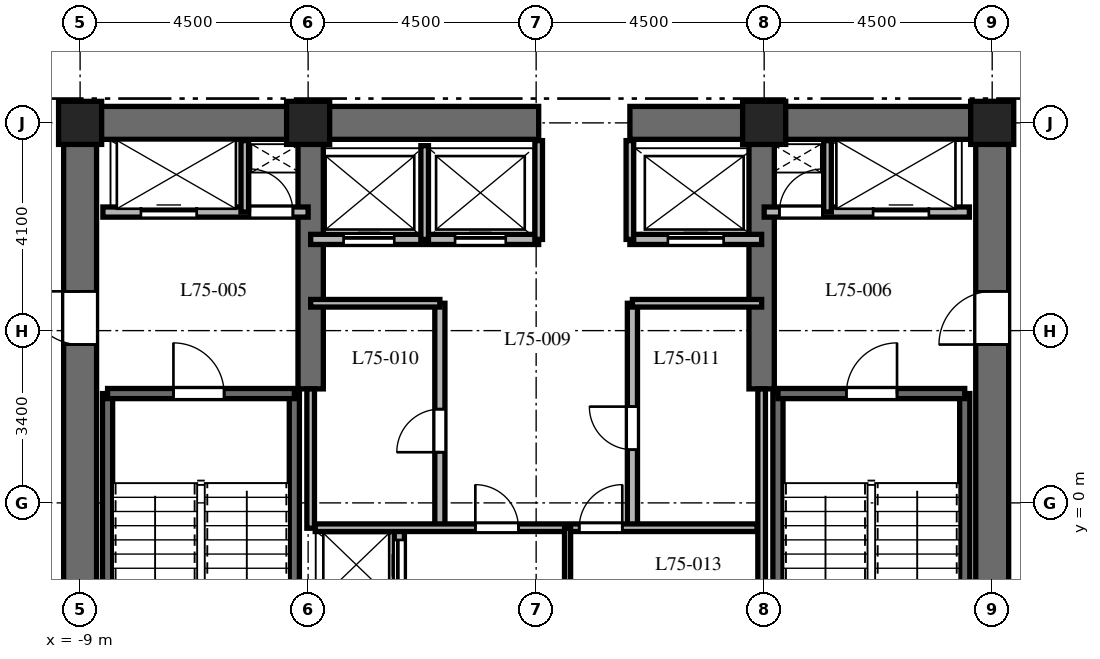
"""IFC4 building model, lengths in metres.
Left out: names, types, materials, properties, quantities, classifications, styles, units other than length and angle.
Written with IfcOpenShell. Run it as: python <this file> out.ifc"""

import sys

from ifc_helpers import new_model, si_unit, direction, frame, frame_2d, origin, origin_2d, place, context, subcontext, project, spatial, rectangle, extrude, element, fill, save


model = new_model("IFC4")
c1 = context("Model", 3, precision=1e-05, world=origin(), true_north=direction((0.0, 1.0)))
c2 = subcontext(c1, "Body", "Model", "MODEL_VIEW")
j1 = project(units=[si_unit("LENGTHUNIT", "METRE"), si_unit("PLANEANGLEUNIT", "RADIAN")], contexts=[c1])
p1 = place(None, origin())
s1 = spatial("IfcSite", under=j1, at=p1, CompositionType="ELEMENT")
p2 = place(p1, origin())
s2 = spatial("IfcBuilding", under=s1, at=p2, CompositionType="ELEMENT")
p3 = place(p2, frame((0.0, 0.0, 301.5)))
s3 = spatial("IfcBuildingStorey", under=s2, at=p3, CompositionType="ELEMENT", Elevation=301.5)
p4 = place(p3, frame((-9.325, 7.5, 0.0), z_axis=(0.0, 0.0, 1.0), x_axis=(1.0, 0.0, 0.0)))
e1 = element("IfcWall", 1, at=p4, inside=s3, PredefinedType="SHEAR", context=c2, shape_type="SweptSolid", body=[
    extrude(rectangle(XDim=9.375, YDim=0.65, at=frame_2d((4.688, 0.0))), origin(), (0.0, 0.0, 1.0), 3.9),
])
p5 = place(p3, frame((1.85, 7.5, 0.0), z_axis=(0.0, 0.0, 1.0), x_axis=(1.0, 0.0, 0.0)))
e2 = element("IfcWall", 2, at=p5, inside=s3, PredefinedType="SHEAR", context=c2, shape_type="SweptSolid", body=[
    extrude(rectangle(XDim=7.475, YDim=0.65, at=frame_2d((3.737, 0.0))), origin(), (0.0, 0.0, 1.0), 3.9),
])
p6 = place(p3, frame((-9.0, -7.175, 0.0), z_axis=(0.0, 0.0, 1.0), x_axis=(0.0, 1.0, 0.0)))
e3 = element("IfcWall", 3, at=p6, inside=s3, PredefinedType="SHEAR", context=c2, shape_type="SweptSolid", body=[
    extrude(rectangle(XDim=14.35, YDim=0.65, at=frame_2d((7.175, 0.0))), origin(), (0.0, 0.0, 1.0), 3.9),
])
p7 = place(p6, frame((10.3, 0.0, 0.0)))
e4 = element("IfcOpeningElement", 4, at=p7, cuts=e3, PredefinedType="OPENING", context=c2, shape_type="SweptSolid", body=[
    extrude(rectangle(XDim=1.05, YDim=2.15, at=frame_2d((0.525, 1.075))), frame((0.0, 0.335, 0.0), z_axis=(0.0, -1.0, 0.0), x_axis=(1.0, 0.0, 0.0)), (0.0, 0.0, 1.0), 0.67),
])
p8 = place(p3, frame((9.0, -7.175, 0.0), z_axis=(0.0, 0.0, 1.0), x_axis=(0.0, 1.0, 0.0)))
e5 = element("IfcWall", 5, at=p8, inside=s3, PredefinedType="SHEAR", context=c2, shape_type="SweptSolid", body=[
    extrude(rectangle(XDim=14.35, YDim=0.65, at=frame_2d((7.175, 0.0))), origin(), (0.0, 0.0, 1.0), 3.9),
])
p9 = place(p8, frame((10.3, 0.0, 0.0)))
e6 = element("IfcOpeningElement", 6, at=p9, cuts=e5, PredefinedType="OPENING", context=c2, shape_type="SweptSolid", body=[
    extrude(rectangle(XDim=1.05, YDim=2.15, at=frame_2d((0.525, 1.075))), frame((0.0, 0.335, 0.0), z_axis=(0.0, -1.0, 0.0), x_axis=(1.0, 0.0, 0.0)), (0.0, 0.0, 1.0), 0.67),
])
for number, where, z_axis, x_axis in (
    (7, (-4.45, 2.25, 0.0), (0.0, 0.0, 1.0), (0.0, 1.0, 0.0)),
    (8, (4.45, 2.25, 0.0), (0.0, 0.0, 1.0), (0.0, 1.0, 0.0)),
):
    element("IfcWall", number, at=place(p3, frame(where, z_axis=z_axis, x_axis=x_axis)), inside=s3, PredefinedType="SHEAR", context=c2, shape_type="SweptSolid", body=[
        extrude(rectangle(XDim=4.925, YDim=0.5, at=frame_2d((2.462, 0.0))), origin(), (0.0, 0.0, 1.0), 3.9),
    ])
for number, where, z_axis, x_axis in (
    (9, (-8.458, -6.985, 0.0), (0.0, 0.0, 1.0), (0.0, 1.0, 0.0)),
    (10, (-4.772, -6.985, 0.0), (0.0, 0.0, 1.0), (0.0, 1.0, 0.0)),
):
    element("IfcWall", number, at=place(p3, frame(where, z_axis=z_axis, x_axis=x_axis)), inside=s3, PredefinedType="SHEAR", context=c2, shape_type="SweptSolid", body=[
        extrude(rectangle(XDim=9.143, YDim=0.2, at=frame_2d((4.572, 0.0))), origin(), (0.0, 0.0, 1.0), 3.9),
    ])
p10 = place(p3, frame((-8.458, 2.158, 0.0), z_axis=(0.0, 0.0, 1.0), x_axis=(1.0, 0.0, 0.0)))
e11 = element("IfcWall", 11, at=p10, inside=s3, PredefinedType="SHEAR", context=c2, shape_type="SweptSolid", body=[
    extrude(rectangle(XDim=3.686, YDim=0.2, at=frame_2d((1.843, 0.0))), origin(), (0.0, 0.0, 1.0), 3.9),
])
p11 = place(p10, frame((1.3, 0.0, 0.0)))
e12 = element("IfcOpeningElement", 12, at=p11, cuts=e11, PredefinedType="OPENING", context=c2, shape_type="SweptSolid", body=[
    extrude(rectangle(XDim=1.0, YDim=2.15, at=frame_2d((0.5, 1.075))), frame((0.0, 0.11, 0.0), z_axis=(0.0, -1.0, 0.0), x_axis=(1.0, 0.0, 0.0)), (0.0, 0.0, 1.0), 0.22),
])
for number, where, z_axis, x_axis in (
    (13, (4.772, -6.985, 0.0), (0.0, 0.0, 1.0), (0.0, 1.0, 0.0)),
    (14, (8.458, -6.985, 0.0), (0.0, 0.0, 1.0), (0.0, 1.0, 0.0)),
):
    element("IfcWall", number, at=place(p3, frame(where, z_axis=z_axis, x_axis=x_axis)), inside=s3, PredefinedType="SHEAR", context=c2, shape_type="SweptSolid", body=[
        extrude(rectangle(XDim=9.143, YDim=0.2, at=frame_2d((4.572, 0.0))), origin(), (0.0, 0.0, 1.0), 3.9),
    ])
p12 = place(p3, frame((4.772, 2.158, 0.0), z_axis=(0.0, 0.0, 1.0), x_axis=(1.0, 0.0, 0.0)))
e15 = element("IfcWall", 15, at=p12, inside=s3, PredefinedType="SHEAR", context=c2, shape_type="SweptSolid", body=[
    extrude(rectangle(XDim=3.686, YDim=0.2, at=frame_2d((1.843, 0.0))), origin(), (0.0, 0.0, 1.0), 3.9),
])
p13 = place(p12, frame((1.35, 0.0, 0.0)))
e16 = element("IfcOpeningElement", 16, at=p13, cuts=e15, PredefinedType="OPENING", context=c2, shape_type="SweptSolid", body=[
    extrude(rectangle(XDim=1.0, YDim=2.15, at=frame_2d((0.5, 1.075))), frame((0.0, 0.11, 0.0), z_axis=(0.0, -1.0, 0.0), x_axis=(1.0, 0.0, 0.0)), (0.0, 0.0, 1.0), 0.22),
])
for number, where, z_axis, x_axis in (
    (17, (9.0, 7.5, 0.0), (0.0, 0.0, 1.0), (1.0, 0.0, 0.0)),
    (18, (4.5, 7.5, 0.0), (0.0, 0.0, 1.0), (1.0, 0.0, 0.0)),
    (19, (-4.5, 7.5, 0.0), (0.0, 0.0, 1.0), (1.0, 0.0, 0.0)),
    (20, (-9.0, 7.5, 0.0), (0.0, 0.0, 1.0), (1.0, 0.0, 0.0)),
):
    element("IfcColumn", number, at=place(p3, frame(where, z_axis=z_axis, x_axis=x_axis)), inside=s3, PredefinedType="COLUMN", context=c2, shape_type="SweptSolid", body=[
        extrude(rectangle(XDim=0.85, YDim=0.85, at=origin_2d()), origin(), (0.0, 0.0, 1.0), 3.9),
    ])
p14 = place(p3, frame((-8.55, 5.74, 0.0), z_axis=(0.0, 0.0, 1.0), x_axis=(1.0, 0.0, 0.0)))
e21 = element("IfcWall", 21, at=p14, inside=s3, PredefinedType="PARTITIONING", context=c2, shape_type="SweptSolid", body=[
    extrude(rectangle(XDim=4.05, YDim=0.2, at=frame_2d((2.025, 0.0))), origin(), (0.0, 0.0, 1.0), 3.58),
])
p15 = place(p14, frame((0.75, 0.0, 0.0)))
e22 = element("IfcOpeningElement", 22, at=p15, cuts=e21, PredefinedType="OPENING", context=c2, shape_type="SweptSolid", body=[
    extrude(rectangle(XDim=1.1, YDim=2.2, at=frame_2d((0.55, 1.1))), frame((0.0, 0.11, 0.0), z_axis=(0.0, -1.0, 0.0), x_axis=(1.0, 0.0, 0.0)), (0.0, 0.0, 1.0), 0.22),
])
p16 = place(p14, frame((2.9, 0.0, 0.0)))
e23 = element("IfcOpeningElement", 23, at=p16, cuts=e21, PredefinedType="OPENING", context=c2, shape_type="SweptSolid", body=[
    extrude(rectangle(XDim=0.85, YDim=2.03, at=frame_2d((0.425, 1.015))), frame((0.0, 0.11, 0.0), z_axis=(0.0, -1.0, 0.0), x_axis=(1.0, 0.0, 0.0)), (0.0, 0.0, 1.0), 0.22),
])
p17 = place(p3, frame((-5.75, 5.74, 0.0), z_axis=(0.0, 0.0, 1.0), x_axis=(0.0, 1.0, 0.0)))
e24 = element("IfcWall", 24, at=p17, inside=s3, PredefinedType="PARTITIONING", context=c2, shape_type="SweptSolid", body=[
    extrude(rectangle(XDim=1.41, YDim=0.15, at=frame_2d((0.705, 0.0))), origin(), (0.0, 0.0, 1.0), 3.58),
])
p18 = place(p3, frame((4.5, 5.74, 0.0), z_axis=(0.0, 0.0, 1.0), x_axis=(1.0, 0.0, 0.0)))
e25 = element("IfcWall", 25, at=p18, inside=s3, PredefinedType="PARTITIONING", context=c2, shape_type="SweptSolid", body=[
    extrude(rectangle(XDim=4.05, YDim=0.2, at=frame_2d((2.025, 0.0))), origin(), (0.0, 0.0, 1.0), 3.58),
])
p19 = place(p18, frame((0.3, 0.0, 0.0)))
e26 = element("IfcOpeningElement", 26, at=p19, cuts=e25, PredefinedType="OPENING", context=c2, shape_type="SweptSolid", body=[
    extrude(rectangle(XDim=0.85, YDim=2.03, at=frame_2d((0.425, 1.015))), frame((0.0, 0.11, 0.0), z_axis=(0.0, -1.0, 0.0), x_axis=(1.0, 0.0, 0.0)), (0.0, 0.0, 1.0), 0.22),
])
p20 = place(p18, frame((2.15, 0.0, 0.0)))
e27 = element("IfcOpeningElement", 27, at=p20, cuts=e25, PredefinedType="OPENING", context=c2, shape_type="SweptSolid", body=[
    extrude(rectangle(XDim=1.1, YDim=2.2, at=frame_2d((0.55, 1.1))), frame((0.0, 0.11, 0.0), z_axis=(0.0, -1.0, 0.0), x_axis=(1.0, 0.0, 0.0)), (0.0, 0.0, 1.0), 0.22),
])
p21 = place(p3, frame((5.75, 5.74, 0.0), z_axis=(0.0, 0.0, 1.0), x_axis=(0.0, 1.0, 0.0)))
e28 = element("IfcWall", 28, at=p21, inside=s3, PredefinedType="PARTITIONING", context=c2, shape_type="SweptSolid", body=[
    extrude(rectangle(XDim=1.41, YDim=0.15, at=frame_2d((0.705, 0.0))), origin(), (0.0, 0.0, 1.0), 3.58),
])
p22 = place(p3, frame((-2.7, -1.972, 0.0), z_axis=(0.0, 0.0, 1.0), x_axis=(0.0, 1.0, 0.0)))
e29 = element("IfcWall", 29, at=p22, inside=s3, PredefinedType="PARTITIONING", context=c2, shape_type="SweptSolid", body=[
    extrude(rectangle(XDim=1.472, YDim=0.2, at=frame_2d((0.736, 0.0))), origin(), (0.0, 0.0, 1.0), 3.58),
])
p23 = place(p22, frame((0.24, 0.0, 0.0)))
e30 = element("IfcOpeningElement", 30, at=p23, cuts=e29, PredefinedType="OPENING", context=c2, shape_type="SweptSolid", body=[
    extrude(rectangle(XDim=1.0, YDim=2.2, at=frame_2d((0.5, 1.1))), frame((0.0, 0.11, 0.0), z_axis=(0.0, -1.0, 0.0), x_axis=(1.0, 0.0, 0.0)), (0.0, 0.0, 1.0), 0.22),
])
p24 = place(p3, frame((-4.45, 5.2, 0.0), z_axis=(0.0, 0.0, 1.0), x_axis=(1.0, 0.0, 0.0)))
e31 = element("IfcWall", 31, at=p24, inside=s3, PredefinedType="PARTITIONING", context=c2, shape_type="SweptSolid", body=[
    extrude(rectangle(XDim=4.5, YDim=0.2, at=frame_2d((2.25, 0.0))), origin(), (0.0, 0.0, 1.0), 3.58),
])
p25 = place(p24, frame((0.65, 0.0, 0.0)))
e32 = element("IfcOpeningElement", 32, at=p25, cuts=e31, PredefinedType="OPENING", context=c2, shape_type="SweptSolid", body=[
    extrude(rectangle(XDim=1.0, YDim=2.2, at=frame_2d((0.5, 1.1))), frame((0.0, 0.11, 0.0), z_axis=(0.0, -1.0, 0.0), x_axis=(1.0, 0.0, 0.0)), (0.0, 0.0, 1.0), 0.22),
])
p26 = place(p24, frame((2.85, 0.0, 0.0)))
e33 = element("IfcOpeningElement", 33, at=p26, cuts=e31, PredefinedType="OPENING", context=c2, shape_type="SweptSolid", body=[
    extrude(rectangle(XDim=1.0, YDim=2.2, at=frame_2d((0.5, 1.1))), frame((0.0, 0.11, 0.0), z_axis=(0.0, -1.0, 0.0), x_axis=(1.0, 0.0, 0.0)), (0.0, 0.0, 1.0), 0.22),
])
p27 = place(p3, frame((1.85, 5.2, 0.0), z_axis=(0.0, 0.0, 1.0), x_axis=(1.0, 0.0, 0.0)))
e34 = element("IfcWall", 34, at=p27, inside=s3, PredefinedType="PARTITIONING", context=c2, shape_type="SweptSolid", body=[
    extrude(rectangle(XDim=2.6, YDim=0.2, at=frame_2d((1.3, 0.0))), origin(), (0.0, 0.0, 1.0), 3.58),
])
p28 = place(p27, frame((0.75, 0.0, 0.0)))
e35 = element("IfcOpeningElement", 35, at=p28, cuts=e34, PredefinedType="OPENING", context=c2, shape_type="SweptSolid", body=[
    extrude(rectangle(XDim=1.1, YDim=2.2, at=frame_2d((0.55, 1.1))), frame((0.0, 0.11, 0.0), z_axis=(0.0, -1.0, 0.0), x_axis=(1.0, 0.0, 0.0)), (0.0, 0.0, 1.0), 0.22),
])
p29 = place(p3, frame((-2.2, 5.2, 0.0), z_axis=(0.0, 0.0, 1.0), x_axis=(0.0, 1.0, 0.0)))
e36 = element("IfcWall", 36, at=p29, inside=s3, PredefinedType="PARTITIONING", context=c2, shape_type="SweptSolid", body=[
    extrude(rectangle(XDim=1.85, YDim=0.15, at=frame_2d((0.925, 0.0))), origin(), (0.0, 0.0, 1.0), 3.58),
])
for number, where, z_axis, x_axis in (
    (37, (0.05, 5.2, 0.0), (0.0, 0.0, 1.0), (0.0, 1.0, 0.0)),
    (38, (1.85, 5.2, 0.0), (0.0, 0.0, 1.0), (0.0, 1.0, 0.0)),
):
    element("IfcWall", number, at=place(p3, frame(where, z_axis=z_axis, x_axis=x_axis)), inside=s3, PredefinedType="PARTITIONING", context=c2, shape_type="SweptSolid", body=[
        extrude(rectangle(XDim=1.95, YDim=0.15, at=frame_2d((0.975, 0.0))), origin(), (0.0, 0.0, 1.0), 3.58),
    ])
p30 = place(p3, frame((-4.45, -0.5, 0.0), z_axis=(0.0, 0.0, 1.0), x_axis=(0.0, 1.0, 0.0)))
e39 = element("IfcWall", 39, at=p30, inside=s3, PredefinedType="PARTITIONING", context=c2, shape_type="SweptSolid", body=[
    extrude(rectangle(XDim=2.75, YDim=0.15, at=frame_2d((1.375, 0.0))), origin(), (0.0, 0.0, 1.0), 3.58),
])
p31 = place(p3, frame((4.45, -1.972, 0.0), z_axis=(0.0, 0.0, 1.0), x_axis=(0.0, 1.0, 0.0)))
e40 = element("IfcWall", 40, at=p31, inside=s3, PredefinedType="PARTITIONING", context=c2, shape_type="SweptSolid", body=[
    extrude(rectangle(XDim=4.222, YDim=0.15, at=frame_2d((2.111, 0.0))), origin(), (0.0, 0.0, 1.0), 3.58),
])
p32 = place(p3, frame((-1.9, -0.5, 0.0), z_axis=(0.0, 0.0, 1.0), x_axis=(0.0, 1.0, 0.0)))
e41 = element("IfcWall", 41, at=p32, inside=s3, PredefinedType="PARTITIONING", context=c2, shape_type="SweptSolid", body=[
    extrude(rectangle(XDim=4.44, YDim=0.2, at=frame_2d((2.22, 0.0))), origin(), (0.0, 0.0, 1.0), 3.58),
])
p33 = place(p32, frame((1.5, 0.0, 0.0)))
e42 = element("IfcOpeningElement", 42, at=p33, cuts=e41, PredefinedType="OPENING", context=c2, shape_type="SweptSolid", body=[
    extrude(rectangle(XDim=0.85, YDim=2.03, at=frame_2d((0.425, 1.015))), frame((0.0, 0.11, 0.0), z_axis=(0.0, -1.0, 0.0), x_axis=(1.0, 0.0, 0.0)), (0.0, 0.0, 1.0), 0.22),
])
p34 = place(p3, frame((-4.45, 3.94, 0.0), z_axis=(0.0, 0.0, 1.0), x_axis=(1.0, 0.0, 0.0)))
e43 = element("IfcWall", 43, at=p34, inside=s3, PredefinedType="PARTITIONING", context=c2, shape_type="SweptSolid", body=[
    extrude(rectangle(XDim=2.55, YDim=0.15, at=frame_2d((1.275, 0.0))), origin(), (0.0, 0.0, 1.0), 3.58),
])
p35 = place(p3, frame((1.9, -0.5, 0.0), z_axis=(0.0, 0.0, 1.0), x_axis=(0.0, 1.0, 0.0)))
e44 = element("IfcWall", 44, at=p35, inside=s3, PredefinedType="PARTITIONING", context=c2, shape_type="SweptSolid", body=[
    extrude(rectangle(XDim=4.44, YDim=0.2, at=frame_2d((2.22, 0.0))), origin(), (0.0, 0.0, 1.0), 3.58),
])
p36 = place(p35, frame((1.55, 0.0, 0.0)))
e45 = element("IfcOpeningElement", 45, at=p36, cuts=e44, PredefinedType="OPENING", context=c2, shape_type="SweptSolid", body=[
    extrude(rectangle(XDim=0.85, YDim=2.03, at=frame_2d((0.425, 1.015))), frame((0.0, 0.11, 0.0), z_axis=(0.0, -1.0, 0.0), x_axis=(1.0, 0.0, 0.0)), (0.0, 0.0, 1.0), 0.22),
])
p37 = place(p3, frame((1.9, 3.94, 0.0), z_axis=(0.0, 0.0, 1.0), x_axis=(1.0, 0.0, 0.0)))
e46 = element("IfcWall", 46, at=p37, inside=s3, PredefinedType="PARTITIONING", context=c2, shape_type="SweptSolid", body=[
    extrude(rectangle(XDim=2.55, YDim=0.15, at=frame_2d((1.275, 0.0))), origin(), (0.0, 0.0, 1.0), 3.58),
])
p38 = place(p3, frame((-4.36, -0.49, 0.0), z_axis=(0.0, 0.0, 1.0), x_axis=(1.0, 0.0, 0.0)))
e47 = element("IfcWall", 47, at=p38, inside=s3, PredefinedType="PARTITIONING", context=c2, shape_type="SweptSolid", body=[
    extrude(rectangle(XDim=8.72, YDim=0.15, at=frame_2d((4.36, 0.0))), origin(), (0.0, 0.0, 1.0), 3.58),
])
p39 = place(p38, frame((3.16, 0.0, 0.0)))
e48 = element("IfcOpeningElement", 48, at=p39, cuts=e47, PredefinedType="OPENING", context=c2, shape_type="SweptSolid", body=[
    extrude(rectangle(XDim=0.85, YDim=2.03, at=frame_2d((0.425, 1.015))), frame((0.0, 0.085, 0.0), z_axis=(0.0, -1.0, 0.0), x_axis=(1.0, 0.0, 0.0)), (0.0, 0.0, 1.0), 0.17),
])
p40 = place(p38, frame((5.21, 0.0, 0.0)))
e49 = element("IfcOpeningElement", 49, at=p40, cuts=e47, PredefinedType="OPENING", context=c2, shape_type="SweptSolid", body=[
    extrude(rectangle(XDim=0.85, YDim=2.03, at=frame_2d((0.425, 1.015))), frame((0.0, 0.085, 0.0), z_axis=(0.0, -1.0, 0.0), x_axis=(1.0, 0.0, 0.0)), (0.0, 0.0, 1.0), 0.17),
])
p41 = place(p3, frame((0.62, -1.972, 0.0), z_axis=(0.0, 0.0, 1.0), x_axis=(0.0, 1.0, 0.0)))
e50 = element("IfcWall", 50, at=p41, inside=s3, PredefinedType="PARTITIONING", context=c2, shape_type="SweptSolid", body=[
    extrude(rectangle(XDim=1.472, YDim=0.12, at=frame_2d((0.736, 0.0))), origin(), (0.0, 0.0, 1.0), 3.58),
])
p42 = place(p11, origin())
e51 = element("IfcDoor", 51, at=p42, inside=s3, OperationType="SINGLE_SWING_LEFT", PredefinedType="DOOR", context=c2, shape_type="SweptSolid", body=[
    extrude(rectangle(XDim=1.0, YDim=2.15, at=frame_2d((0.5, 1.075))), frame((0.0, 0.025, 0.0), z_axis=(0.0, -1.0, 0.0), x_axis=(1.0, 0.0, 0.0)), (0.0, 0.0, 1.0), 0.05),
])
fill(e12, e51)
p43 = place(p13, origin())
e52 = element("IfcDoor", 52, at=p43, inside=s3, OperationType="SINGLE_SWING_RIGHT", PredefinedType="DOOR", context=c2, shape_type="SweptSolid", body=[
    extrude(rectangle(XDim=1.0, YDim=2.15, at=frame_2d((0.5, 1.075))), frame((0.0, 0.025, 0.0), z_axis=(0.0, -1.0, 0.0), x_axis=(1.0, 0.0, 0.0)), (0.0, 0.0, 1.0), 0.05),
])
fill(e16, e52)
p44 = place(p7, origin())
e53 = element("IfcDoor", 53, at=p44, inside=s3, OperationType="SINGLE_SWING_RIGHT", PredefinedType="DOOR", context=c2, shape_type="SweptSolid", body=[
    extrude(rectangle(XDim=1.05, YDim=2.15, at=frame_2d((0.525, 1.075))), frame((0.0, 0.025, 0.0), z_axis=(0.0, -1.0, 0.0), x_axis=(1.0, 0.0, 0.0)), (0.0, 0.0, 1.0), 0.05),
])
fill(e4, e53)
p45 = place(p9, origin())
e54 = element("IfcDoor", 54, at=p45, inside=s3, OperationType="SINGLE_SWING_LEFT", PredefinedType="DOOR", context=c2, shape_type="SweptSolid", body=[
    extrude(rectangle(XDim=1.05, YDim=2.15, at=frame_2d((0.525, 1.075))), frame((0.0, 0.025, 0.0), z_axis=(0.0, -1.0, 0.0), x_axis=(1.0, 0.0, 0.0)), (0.0, 0.0, 1.0), 0.05),
])
fill(e6, e54)
p46 = place(p15, origin())
e55 = element("IfcDoor", 55, at=p46, inside=s3, OperationType="SLIDING_TO_LEFT", PredefinedType="DOOR", context=c2, shape_type="SweptSolid", body=[
    extrude(rectangle(XDim=1.1, YDim=2.2, at=frame_2d((0.55, 1.1))), frame((0.0, 0.025, 0.0), z_axis=(0.0, -1.0, 0.0), x_axis=(1.0, 0.0, 0.0)), (0.0, 0.0, 1.0), 0.05),
])
fill(e22, e55)
p47 = place(p16, origin())
e56 = element("IfcDoor", 56, at=p47, inside=s3, OperationType="SINGLE_SWING_LEFT", PredefinedType="DOOR", context=c2, shape_type="SweptSolid", body=[
    extrude(rectangle(XDim=0.85, YDim=2.03, at=frame_2d((0.425, 1.015))), frame((0.0, 0.025, 0.0), z_axis=(0.0, -1.0, 0.0), x_axis=(1.0, 0.0, 0.0)), (0.0, 0.0, 1.0), 0.05),
])
fill(e23, e56)
p48 = place(p19, origin())
e57 = element("IfcDoor", 57, at=p48, inside=s3, OperationType="SINGLE_SWING_RIGHT", PredefinedType="DOOR", context=c2, shape_type="SweptSolid", body=[
    extrude(rectangle(XDim=0.85, YDim=2.03, at=frame_2d((0.425, 1.015))), frame((0.0, 0.025, 0.0), z_axis=(0.0, -1.0, 0.0), x_axis=(1.0, 0.0, 0.0)), (0.0, 0.0, 1.0), 0.05),
])
fill(e26, e57)
p49 = place(p20, origin())
e58 = element("IfcDoor", 58, at=p49, inside=s3, OperationType="SLIDING_TO_RIGHT", PredefinedType="DOOR", context=c2, shape_type="SweptSolid", body=[
    extrude(rectangle(XDim=1.1, YDim=2.2, at=frame_2d((0.55, 1.1))), frame((0.0, 0.025, 0.0), z_axis=(0.0, -1.0, 0.0), x_axis=(1.0, 0.0, 0.0)), (0.0, 0.0, 1.0), 0.05),
])
fill(e27, e58)
p50 = place(p23, origin())
e59 = element("IfcDoor", 59, at=p50, inside=s3, OperationType="SLIDING_TO_LEFT", PredefinedType="DOOR", context=c2, shape_type="SweptSolid", body=[
    extrude(rectangle(XDim=1.0, YDim=2.2, at=frame_2d((0.5, 1.1))), frame((0.0, 0.025, 0.0), z_axis=(0.0, -1.0, 0.0), x_axis=(1.0, 0.0, 0.0)), (0.0, 0.0, 1.0), 0.05),
])
fill(e30, e59)
p51 = place(p25, origin())
e60 = element("IfcDoor", 60, at=p51, inside=s3, OperationType="SLIDING_TO_LEFT", PredefinedType="DOOR", context=c2, shape_type="SweptSolid", body=[
    extrude(rectangle(XDim=1.0, YDim=2.2, at=frame_2d((0.5, 1.1))), frame((0.0, 0.025, 0.0), z_axis=(0.0, -1.0, 0.0), x_axis=(1.0, 0.0, 0.0)), (0.0, 0.0, 1.0), 0.05),
])
fill(e32, e60)
p52 = place(p26, origin())
e61 = element("IfcDoor", 61, at=p52, inside=s3, OperationType="SLIDING_TO_RIGHT", PredefinedType="DOOR", context=c2, shape_type="SweptSolid", body=[
    extrude(rectangle(XDim=1.0, YDim=2.2, at=frame_2d((0.5, 1.1))), frame((0.0, 0.025, 0.0), z_axis=(0.0, -1.0, 0.0), x_axis=(1.0, 0.0, 0.0)), (0.0, 0.0, 1.0), 0.05),
])
fill(e33, e61)
p53 = place(p28, origin())
e62 = element("IfcDoor", 62, at=p53, inside=s3, OperationType="SLIDING_TO_RIGHT", PredefinedType="DOOR", context=c2, shape_type="SweptSolid", body=[
    extrude(rectangle(XDim=1.1, YDim=2.2, at=frame_2d((0.55, 1.1))), frame((0.0, 0.025, 0.0), z_axis=(0.0, -1.0, 0.0), x_axis=(1.0, 0.0, 0.0)), (0.0, 0.0, 1.0), 0.05),
])
fill(e35, e62)
p54 = place(p33, origin())
e63 = element("IfcDoor", 63, at=p54, inside=s3, OperationType="SINGLE_SWING_LEFT", PredefinedType="DOOR", context=c2, shape_type="SweptSolid", body=[
    extrude(rectangle(XDim=0.85, YDim=2.03, at=frame_2d((0.425, 1.015))), frame((0.0, 0.025, 0.0), z_axis=(0.0, -1.0, 0.0), x_axis=(1.0, 0.0, 0.0)), (0.0, 0.0, 1.0), 0.05),
])
fill(e42, e63)
p55 = place(p36, origin())
e64 = element("IfcDoor", 64, at=p55, inside=s3, OperationType="SINGLE_SWING_RIGHT", PredefinedType="DOOR", context=c2, shape_type="SweptSolid", body=[
    extrude(rectangle(XDim=0.85, YDim=2.03, at=frame_2d((0.425, 1.015))), frame((0.0, 0.025, 0.0), z_axis=(0.0, -1.0, 0.0), x_axis=(1.0, 0.0, 0.0)), (0.0, 0.0, 1.0), 0.05),
])
fill(e45, e64)
p56 = place(p39, origin())
e65 = element("IfcDoor", 65, at=p56, inside=s3, OperationType="SINGLE_SWING_LEFT", PredefinedType="DOOR", context=c2, shape_type="SweptSolid", body=[
    extrude(rectangle(XDim=0.85, YDim=2.03, at=frame_2d((0.425, 1.015))), frame((0.0, 0.025, 0.0), z_axis=(0.0, -1.0, 0.0), x_axis=(1.0, 0.0, 0.0)), (0.0, 0.0, 1.0), 0.05),
])
fill(e48, e65)
p57 = place(p40, origin())
e66 = element("IfcDoor", 66, at=p57, inside=s3, OperationType="SINGLE_SWING_RIGHT", PredefinedType="DOOR", context=c2, shape_type="SweptSolid", body=[
    extrude(rectangle(XDim=0.85, YDim=2.03, at=frame_2d((0.425, 1.015))), frame((0.0, 0.025, 0.0), z_axis=(0.0, -1.0, 0.0), x_axis=(1.0, 0.0, 0.0)), (0.0, 0.0, 1.0), 0.05),
])
fill(e49, e66)
save(model, sys.argv[1])
